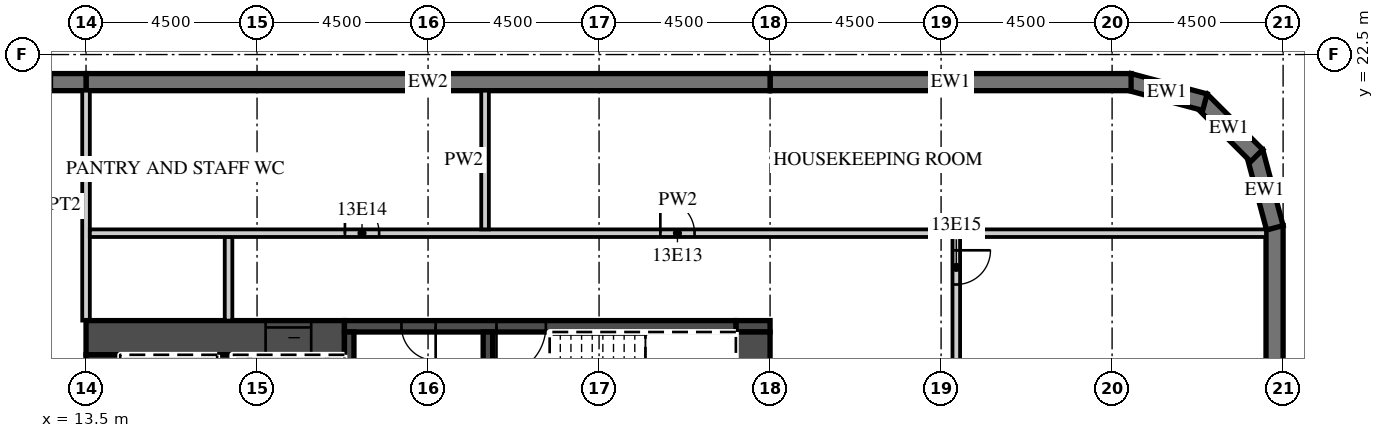
"""IFC4 building model, lengths in metres.
Left out: names, types, materials, properties, quantities, classifications, styles, units other than length and angle.
Written with IfcOpenShell. Run it as: python <this file> out.ifc"""

import sys

from ifc_helpers import new_model, si_unit, direction, frame, frame_2d, origin, place, context, subcontext, project, spatial, polyline, rectangle, outline, extrude, element, fill, save


model = new_model("IFC4")
c1 = context("Model", 3, precision=1e-05, world=origin(), true_north=direction((0.0, 1.0)))
c2 = subcontext(c1, "Body", "Model", "MODEL_VIEW")
j1 = project(units=[si_unit("LENGTHUNIT", "METRE"), si_unit("PLANEANGLEUNIT", "RADIAN")], contexts=[c1])
p1 = place(None, origin())
s1 = spatial("IfcSite", under=j1, at=p1, CompositionType="ELEMENT")
p2 = place(p1, origin())
s2 = spatial("IfcBuilding", under=s1, at=p2, CompositionType="ELEMENT")
p3 = place(p2, frame((0.0, 0.0, 73.2)))
s3 = spatial("IfcBuildingStorey", under=s2, at=p3, CompositionType="ELEMENT", Elevation=73.2)
p4 = place(p3, frame((44.775, -18.0, 0.0), z_axis=(0.0, 0.0, 1.0), x_axis=(0.0, 1.0, 0.0)))
e1 = element("IfcWall", 1, at=p4, inside=s3, PredefinedType="SOLIDWALL", context=c2, shape_type="SweptSolid", body=[
    extrude(rectangle(XDim=36.0, YDim=0.45, at=frame_2d((18.0, 0.0))), origin(), (0.0, 0.0, 1.0), 3.02),
])
p5 = place(p4, frame((3.9, 0.0, 0.45)))
e2 = element("IfcOpeningElement", 2, at=p5, cuts=e1, PredefinedType="OPENING", context=c2, shape_type="SweptSolid", body=[
    extrude(rectangle(XDim=3.3, YDim=2.25, at=frame_2d((1.65, 1.125))), frame((0.0, 0.235, 0.0), z_axis=(0.0, -1.0, 0.0), x_axis=(1.0, 0.0, 0.0)), (0.0, 0.0, 1.0), 0.47),
])
p6 = place(p4, frame((8.4, 0.0, 0.45)))
e3 = element("IfcOpeningElement", 3, at=p6, cuts=e1, PredefinedType="OPENING", context=c2, shape_type="SweptSolid", body=[
    extrude(rectangle(XDim=3.3, YDim=2.25, at=frame_2d((1.65, 1.125))), frame((0.0, 0.235, 0.0), z_axis=(0.0, -1.0, 0.0), x_axis=(1.0, 0.0, 0.0)), (0.0, 0.0, 1.0), 0.47),
])
p7 = place(p4, frame((12.9, 0.0, 0.45)))
e4 = element("IfcOpeningElement", 4, at=p7, cuts=e1, PredefinedType="OPENING", context=c2, shape_type="SweptSolid", body=[
    extrude(rectangle(XDim=3.3, YDim=2.25, at=frame_2d((1.65, 1.125))), frame((0.0, 0.235, 0.0), z_axis=(0.0, -1.0, 0.0), x_axis=(1.0, 0.0, 0.0)), (0.0, 0.0, 1.0), 0.47),
])
p8 = place(p3, frame((44.783, 17.942, 0.0), z_axis=(0.0, 0.0, 1.0), x_axis=(-0.25881466832, 0.965926999034, 0.0)))
e5 = element("IfcWall", 5, at=p8, inside=s3, PredefinedType="SOLIDWALL", context=c2, shape_type="SweptSolid", body=[
    extrude(outline(polyline([(0.0, -0.225), (2.071, -0.225), (1.95, 0.225), (0.121, 0.225), (0.0, -0.225)])), origin(), (0.0, 0.0, 1.0), 3.02),
])
p9 = place(p3, frame((44.305, 19.841, 0.0), z_axis=(0.0, 0.0, 1.0), x_axis=(-0.707106781187, 0.707106781187, 0.0)))
e6 = element("IfcWall", 6, at=p9, inside=s3, PredefinedType="SOLIDWALL", context=c2, shape_type="SweptSolid", body=[
    extrude(outline(polyline([(0.0, -0.225), (2.071, -0.225), (1.95, 0.225), (0.121, 0.225), (0.0, -0.225)])), origin(), (0.0, 0.0, 1.0), 3.02),
])
p10 = place(p3, frame((42.942, 21.247, 0.0), z_axis=(0.0, 0.0, 1.0), x_axis=(-0.965926999034, 0.25881466832, 0.0)))
e7 = element("IfcWall", 7, at=p10, inside=s3, PredefinedType="SOLIDWALL", context=c2, shape_type="SweptSolid", body=[
    extrude(outline(polyline([(-0.0, -0.225), (2.07, -0.225), (1.95, 0.225), (0.12, 0.225), (-0.0, -0.225)])), origin(), (0.0, 0.0, 1.0), 3.02),
])
p11 = place(p3, frame((41.0, 21.775, 0.0), z_axis=(0.0, 0.0, 1.0), x_axis=(-1.0, 0.0, 0.0)))
e8 = element("IfcWall", 8, at=p11, inside=s3, PredefinedType="SOLIDWALL", context=c2, shape_type="SweptSolid", body=[
    extrude(rectangle(XDim=9.5, YDim=0.45, at=frame_2d((4.75, 0.0))), origin(), (0.0, 0.0, 1.0), 3.02),
])
p12 = place(p3, frame((31.5, 21.775, 0.0), z_axis=(0.0, 0.0, 1.0), x_axis=(-1.0, 0.0, 0.0)))
e9 = element("IfcWall", 9, at=p12, inside=s3, PredefinedType="SOLIDWALL", context=c2, shape_type="SweptSolid", body=[
    extrude(rectangle(XDim=18.0, YDim=0.45, at=frame_2d((9.0, 0.0))), origin(), (0.0, 0.0, 1.0), 3.02),
])
p13 = place(p3, frame((13.5, 21.775, 0.0), z_axis=(0.0, 0.0, 1.0), x_axis=(-1.0, 0.0, 0.0)))
e10 = element("IfcWall", 10, at=p13, inside=s3, PredefinedType="SOLIDWALL", context=c2, shape_type="SweptSolid", body=[
    extrude(rectangle(XDim=54.5, YDim=0.45, at=frame_2d((27.25, 0.0))), origin(), (0.0, 0.0, 1.0), 3.02),
])
p14 = place(p13, frame((0.9, 0.0, 0.45)))
e11 = element("IfcOpeningElement", 11, at=p14, cuts=e10, PredefinedType="OPENING", context=c2, shape_type="SweptSolid", body=[
    extrude(rectangle(XDim=2.7, YDim=2.25, at=frame_2d((1.35, 1.125))), frame((0.0, 0.235, 0.0), z_axis=(0.0, -1.0, 0.0), x_axis=(1.0, 0.0, 0.0)), (0.0, 0.0, 1.0), 0.47),
])
p15 = place(p13, frame((5.4, 0.0, 0.45)))
e12 = element("IfcOpeningElement", 12, at=p15, cuts=e10, PredefinedType="OPENING", context=c2, shape_type="SweptSolid", body=[
    extrude(rectangle(XDim=2.7, YDim=2.25, at=frame_2d((1.35, 1.125))), frame((0.0, 0.235, 0.0), z_axis=(0.0, -1.0, 0.0), x_axis=(1.0, 0.0, 0.0)), (0.0, 0.0, 1.0), 0.47),
])
p16 = place(p13, frame((9.9, 0.0, 0.45)))
e13 = element("IfcOpeningElement", 13, at=p16, cuts=e10, PredefinedType="OPENING", context=c2, shape_type="SweptSolid", body=[
    extrude(rectangle(XDim=2.7, YDim=2.25, at=frame_2d((1.35, 1.125))), frame((0.0, 0.235, 0.0), z_axis=(0.0, -1.0, 0.0), x_axis=(1.0, 0.0, 0.0)), (0.0, 0.0, 1.0), 0.47),
])
p17 = place(p13, frame((14.4, 0.0, 0.45)))
e14 = element("IfcOpeningElement", 14, at=p17, cuts=e10, PredefinedType="OPENING", context=c2, shape_type="SweptSolid", body=[
    extrude(rectangle(XDim=2.7, YDim=2.25, at=frame_2d((1.35, 1.125))), frame((0.0, 0.235, 0.0), z_axis=(0.0, -1.0, 0.0), x_axis=(1.0, 0.0, 0.0)), (0.0, 0.0, 1.0), 0.47),
])
p18 = place(p13, frame((18.9, 0.0, 0.45)))
e15 = element("IfcOpeningElement", 15, at=p18, cuts=e10, PredefinedType="OPENING", context=c2, shape_type="SweptSolid", body=[
    extrude(rectangle(XDim=2.7, YDim=2.25, at=frame_2d((1.35, 1.125))), frame((0.0, 0.235, 0.0), z_axis=(0.0, -1.0, 0.0), x_axis=(1.0, 0.0, 0.0)), (0.0, 0.0, 1.0), 0.47),
])
p19 = place(p13, frame((23.4, 0.0, 0.45)))
e16 = element("IfcOpeningElement", 16, at=p19, cuts=e10, PredefinedType="OPENING", context=c2, shape_type="SweptSolid", body=[
    extrude(rectangle(XDim=2.7, YDim=2.25, at=frame_2d((1.35, 1.125))), frame((0.0, 0.235, 0.0), z_axis=(0.0, -1.0, 0.0), x_axis=(1.0, 0.0, 0.0)), (0.0, 0.0, 1.0), 0.47),
])
p20 = place(p13, frame((27.9, 0.0, 0.45)))
e17 = element("IfcOpeningElement", 17, at=p20, cuts=e10, PredefinedType="OPENING", context=c2, shape_type="SweptSolid", body=[
    extrude(rectangle(XDim=2.7, YDim=2.25, at=frame_2d((1.35, 1.125))), frame((0.0, 0.235, 0.0), z_axis=(0.0, -1.0, 0.0), x_axis=(1.0, 0.0, 0.0)), (0.0, 0.0, 1.0), 0.47),
])
p21 = place(p13, frame((32.4, 0.0, 0.45)))
e18 = element("IfcOpeningElement", 18, at=p21, cuts=e10, PredefinedType="OPENING", context=c2, shape_type="SweptSolid", body=[
    extrude(rectangle(XDim=2.7, YDim=2.25, at=frame_2d((1.35, 1.125))), frame((0.0, 0.235, 0.0), z_axis=(0.0, -1.0, 0.0), x_axis=(1.0, 0.0, 0.0)), (0.0, 0.0, 1.0), 0.47),
])
p22 = place(p13, frame((36.9, 0.0, 0.45)))
e19 = element("IfcOpeningElement", 19, at=p22, cuts=e10, PredefinedType="OPENING", context=c2, shape_type="SweptSolid", body=[
    extrude(rectangle(XDim=2.7, YDim=2.25, at=frame_2d((1.35, 1.125))), frame((0.0, 0.235, 0.0), z_axis=(0.0, -1.0, 0.0), x_axis=(1.0, 0.0, 0.0)), (0.0, 0.0, 1.0), 0.47),
])
p23 = place(p13, frame((41.4, 0.0, 0.45)))
e20 = element("IfcOpeningElement", 20, at=p23, cuts=e10, PredefinedType="OPENING", context=c2, shape_type="SweptSolid", body=[
    extrude(rectangle(XDim=2.7, YDim=2.25, at=frame_2d((1.35, 1.125))), frame((0.0, 0.235, 0.0), z_axis=(0.0, -1.0, 0.0), x_axis=(1.0, 0.0, 0.0)), (0.0, 0.0, 1.0), 0.47),
])
p24 = place(p13, frame((45.9, 0.0, 0.45)))
e21 = element("IfcOpeningElement", 21, at=p24, cuts=e10, PredefinedType="OPENING", context=c2, shape_type="SweptSolid", body=[
    extrude(rectangle(XDim=2.7, YDim=2.25, at=frame_2d((1.35, 1.125))), frame((0.0, 0.235, 0.0), z_axis=(0.0, -1.0, 0.0), x_axis=(1.0, 0.0, 0.0)), (0.0, 0.0, 1.0), 0.47),
])
p25 = place(p13, frame((50.4, 0.0, 0.45)))
e22 = element("IfcOpeningElement", 22, at=p25, cuts=e10, PredefinedType="OPENING", context=c2, shape_type="SweptSolid", body=[
    extrude(rectangle(XDim=2.7, YDim=2.25, at=frame_2d((1.35, 1.125))), frame((0.0, 0.235, 0.0), z_axis=(0.0, -1.0, 0.0), x_axis=(1.0, 0.0, 0.0)), (0.0, 0.0, 1.0), 0.47),
])
p26 = place(p3, frame((13.5, 15.5, 0.0), z_axis=(0.0, 0.0, 1.0), x_axis=(0.0, 1.0, 0.0)))
e23 = element("IfcWall", 23, at=p26, inside=s3, PredefinedType="PARTITIONING", context=c2, shape_type="SweptSolid", body=[
    extrude(rectangle(XDim=6.05, YDim=0.2, at=frame_2d((3.025, 0.0))), origin(), (0.0, 0.0, 1.0), 3.02),
])
p27 = place(p3, frame((13.5, 15.05, 0.0), z_axis=(0.0, 0.0, 1.0), x_axis=(1.0, 0.0, 0.0)))
e24 = element("IfcWall", 24, at=p27, inside=s3, PredefinedType="SHEAR", context=c2, shape_type="SweptSolid", body=[
    extrude(rectangle(XDim=6.8, YDim=0.9, at=frame_2d((3.4, 0.0))), origin(), (0.0, 0.0, 1.0), 3.02),
])
p28 = place(p27, frame((4.725, 0.0, 0.0)))
e25 = element("IfcOpeningElement", 25, at=p28, cuts=e24, PredefinedType="OPENING", context=c2, shape_type="SweptSolid", body=[
    extrude(rectangle(XDim=1.2, YDim=2.1, at=frame_2d((0.6, 1.05))), frame((0.0, 0.46, 0.0), z_axis=(0.0, -1.0, 0.0), x_axis=(1.0, 0.0, 0.0)), (0.0, 0.0, 1.0), 0.92),
])
p29 = place(p3, frame((30.6, 15.35, 0.0), z_axis=(0.0, 0.0, 1.0), x_axis=(1.0, 0.0, 0.0)))
e26 = element("IfcWall", 26, at=p29, inside=s3, PredefinedType="SHEAR", context=c2, shape_type="SweptSolid", body=[
    extrude(rectangle(XDim=0.9, YDim=0.3, at=frame_2d((0.45, 0.0))), origin(), (0.0, 0.0, 1.0), 3.02),
])
p30 = place(p3, frame((20.3, 15.35, 0.0), z_axis=(0.0, 0.0, 1.0), x_axis=(1.0, 0.0, 0.0)))
e27 = element("IfcWall", 27, at=p30, inside=s3, PredefinedType="SHEAR", context=c2, shape_type="SweptSolid", body=[
    extrude(rectangle(XDim=10.3, YDim=0.3, at=frame_2d((5.15, 0.0))), origin(), (0.0, 0.0, 1.0), 3.02),
])
p31 = place(p30, frame((4.0, 0.0, 0.0)))
e28 = element("IfcOpeningElement", 28, at=p31, cuts=e27, PredefinedType="OPENING", context=c2, shape_type="SweptSolid", body=[
    extrude(rectangle(XDim=1.3, YDim=2.1, at=frame_2d((0.65, 1.05))), frame((0.0, 0.16, 0.0), z_axis=(0.0, -1.0, 0.0), x_axis=(1.0, 0.0, 0.0)), (0.0, 0.0, 1.0), 0.32),
])
p32 = place(p30, frame((1.5, 0.0, 0.0)))
e29 = element("IfcOpeningElement", 29, at=p32, cuts=e27, PredefinedType="OPENING", context=c2, shape_type="SweptSolid", body=[
    extrude(rectangle(XDim=0.9, YDim=2.1, at=frame_2d((0.45, 1.05))), frame((0.0, 0.16, 0.0), z_axis=(0.0, -1.0, 0.0), x_axis=(1.0, 0.0, 0.0)), (0.0, 0.0, 1.0), 0.32),
])
p33 = place(p3, frame((31.05, 2.4, 0.0), z_axis=(0.0, 0.0, 1.0), x_axis=(0.0, 1.0, 0.0)))
e30 = element("IfcWall", 30, at=p33, inside=s3, PredefinedType="SHEAR", context=c2, shape_type="SweptSolid", body=[
    extrude(rectangle(XDim=12.8, YDim=0.9, at=frame_2d((6.4, 0.0))), origin(), (0.0, 0.0, 1.0), 3.02),
])
p34 = place(p33, frame((0.2, 0.0, 0.0)))
e31 = element("IfcOpeningElement", 31, at=p34, cuts=e30, PredefinedType="OPENING", context=c2, shape_type="SweptSolid", body=[
    extrude(rectangle(XDim=1.1, YDim=2.1, at=frame_2d((0.55, 1.05))), frame((0.0, 0.46, 0.0), z_axis=(0.0, -1.0, 0.0), x_axis=(1.0, 0.0, 0.0)), (0.0, 0.0, 1.0), 0.92),
])
p35 = place(p3, frame((13.95, 2.4, 0.0), z_axis=(0.0, 0.0, 1.0), x_axis=(0.0, 1.0, 0.0)))
e32 = element("IfcWall", 32, at=p35, inside=s3, PredefinedType="SHEAR", context=c2, shape_type="SweptSolid", body=[
    extrude(rectangle(XDim=12.2, YDim=0.9, at=frame_2d((6.1, 0.0))), origin(), (0.0, 0.0, 1.0), 3.02),
])
p36 = place(p3, frame((17.15, 8.8, 0.0), z_axis=(0.0, 0.0, 1.0), x_axis=(0.0, 1.0, 0.0)))
e33 = element("IfcWall", 33, at=p36, inside=s3, PredefinedType="SHEAR", context=c2, shape_type="SweptSolid", body=[
    extrude(rectangle(XDim=5.8, YDim=0.4, at=frame_2d((2.9, 0.0))), origin(), (0.0, 0.0, 1.0), 3.02),
])
for number, where, z_axis, x_axis in (
    (34, (20.425, 11.95, 0.0), (0.0, 0.0, 1.0), (0.0, 1.0, 0.0)),
    (35, (24.075, 11.95, 0.0), (0.0, 0.0, 1.0), (0.0, 1.0, 0.0)),
):
    element("IfcWall", number, at=place(p3, frame(where, z_axis=z_axis, x_axis=x_axis)), inside=s3, PredefinedType="SHEAR", context=c2, shape_type="SweptSolid", body=[
        extrude(rectangle(XDim=3.25, YDim=0.25, at=frame_2d((1.625, 0.0))), origin(), (0.0, 0.0, 1.0), 3.02),
    ])
p37 = place(p3, frame((17.25, 15.5, 0.0), z_axis=(0.0, 0.0, 1.0), x_axis=(0.0, 1.0, 0.0)))
e36 = element("IfcWall", 36, at=p37, inside=s3, PredefinedType="PARTITIONING", context=c2, shape_type="SweptSolid", body=[
    extrude(rectangle(XDim=2.2, YDim=0.2, at=frame_2d((1.1, 0.0))), origin(), (0.0, 0.0, 1.0), 3.02),
])
p38 = place(p3, frame((36.4, 1.75, 0.0), z_axis=(0.0, 0.0, 1.0), x_axis=(0.0, 1.0, 0.0)))
e37 = element("IfcWall", 37, at=p38, inside=s3, PredefinedType="PARTITIONING", context=c2, shape_type="SweptSolid", body=[
    extrude(rectangle(XDim=15.95, YDim=0.2, at=frame_2d((7.975, 0.0))), origin(), (0.0, 0.0, 1.0), 3.02),
])
p39 = place(p38, frame((14.7, 0.0, 0.0)))
e38 = element("IfcOpeningElement", 38, at=p39, cuts=e37, PredefinedType="OPENING", context=c2, shape_type="SweptSolid", body=[
    extrude(rectangle(XDim=0.9, YDim=2.1, at=frame_2d((0.45, 1.05))), frame((0.0, 0.11, 0.0), z_axis=(0.0, -1.0, 0.0), x_axis=(1.0, 0.0, 0.0)), (0.0, 0.0, 1.0), 0.22),
])
p40 = place(p3, frame((13.6, 17.8, 0.0), z_axis=(0.0, 0.0, 1.0), x_axis=(1.0, 0.0, 0.0)))
e39 = element("IfcWall", 39, at=p40, inside=s3, PredefinedType="PARTITIONING", context=c2, shape_type="SweptSolid", body=[
    extrude(rectangle(XDim=30.95, YDim=0.2, at=frame_2d((15.475, 0.0))), origin(), (0.0, 0.0, 1.0), 3.02),
])
p41 = place(p40, frame((15.012, 0.0, 0.0)))
e40 = element("IfcOpeningElement", 40, at=p41, cuts=e39, PredefinedType="OPENING", context=c2, shape_type="SweptSolid", body=[
    extrude(rectangle(XDim=0.9, YDim=2.1, at=frame_2d((0.45, 1.05))), frame((0.0, 0.11, 0.0), z_axis=(0.0, -1.0, 0.0), x_axis=(1.0, 0.0, 0.0)), (0.0, 0.0, 1.0), 0.22),
])
p42 = place(p40, frame((6.712, 0.0, 0.0)))
e41 = element("IfcOpeningElement", 41, at=p42, cuts=e39, PredefinedType="OPENING", context=c2, shape_type="SweptSolid", body=[
    extrude(rectangle(XDim=0.9, YDim=2.1, at=frame_2d((0.45, 1.05))), frame((0.0, 0.11, 0.0), z_axis=(0.0, -1.0, 0.0), x_axis=(1.0, 0.0, 0.0)), (0.0, 0.0, 1.0), 0.22),
])
p43 = place(p3, frame((24.0, 17.9, 0.0), z_axis=(0.0, 0.0, 1.0), x_axis=(0.0, 1.0, 0.0)))
e42 = element("IfcWall", 42, at=p43, inside=s3, PredefinedType="PARTITIONING", context=c2, shape_type="SweptSolid", body=[
    extrude(rectangle(XDim=3.65, YDim=0.2, at=frame_2d((1.825, 0.0))), origin(), (0.0, 0.0, 1.0), 3.02),
])
p44 = place(p28, origin())
e43 = element("IfcDoor", 43, at=p44, inside=s3, OperationType="SLIDING_TO_LEFT", PredefinedType="DOOR", context=c2, shape_type="SweptSolid", body=[
    extrude(rectangle(XDim=1.2, YDim=2.1, at=frame_2d((0.6, 1.05))), frame((0.0, 0.025, 0.0), z_axis=(0.0, -1.0, 0.0), x_axis=(1.0, 0.0, 0.0)), (0.0, 0.0, 1.0), 0.05),
])
fill(e25, e43)
p45 = place(p31, origin())
e44 = element("IfcDoor", 44, at=p45, inside=s3, OperationType="SINGLE_SWING_LEFT", PredefinedType="DOOR", context=c2, shape_type="SweptSolid", body=[
    extrude(rectangle(XDim=1.3, YDim=2.1, at=frame_2d((0.65, 1.05))), frame((0.0, 0.025, 0.0), z_axis=(0.0, -1.0, 0.0), x_axis=(1.0, 0.0, 0.0)), (0.0, 0.0, 1.0), 0.05),
])
fill(e28, e44)
p46 = place(p32, origin())
e45 = element("IfcDoor", 45, at=p46, inside=s3, OperationType="SINGLE_SWING_RIGHT", PredefinedType="DOOR", context=c2, shape_type="SweptSolid", body=[
    extrude(rectangle(XDim=0.9, YDim=2.1, at=frame_2d((0.45, 1.05))), frame((0.0, 0.025, 0.0), z_axis=(0.0, -1.0, 0.0), x_axis=(1.0, 0.0, 0.0)), (0.0, 0.0, 1.0), 0.05),
])
fill(e29, e45)
p47 = place(p41, origin())
e46 = element("IfcDoor", 46, at=p47, inside=s3, OperationType="SINGLE_SWING_LEFT", PredefinedType="DOOR", context=c2, shape_type="SweptSolid", body=[
    extrude(rectangle(XDim=0.9, YDim=2.1, at=frame_2d((0.45, 1.05))), frame((0.0, 0.025, 0.0), z_axis=(0.0, -1.0, 0.0), x_axis=(1.0, 0.0, 0.0)), (0.0, 0.0, 1.0), 0.05),
])
fill(e40, e46)
p48 = place(p42, origin())
e47 = element("IfcDoor", 47, at=p48, inside=s3, OperationType="SINGLE_SWING_LEFT", PredefinedType="DOOR", context=c2, shape_type="SweptSolid", body=[
    extrude(rectangle(XDim=0.9, YDim=2.1, at=frame_2d((0.45, 1.05))), frame((0.0, 0.025, 0.0), z_axis=(0.0, -1.0, 0.0), x_axis=(1.0, 0.0, 0.0)), (0.0, 0.0, 1.0), 0.05),
])
fill(e41, e47)
p49 = place(p39, origin())
e48 = element("IfcDoor", 48, at=p49, inside=s3, OperationType="SINGLE_SWING_RIGHT", PredefinedType="DOOR", context=c2, shape_type="SweptSolid", body=[
    extrude(rectangle(XDim=0.9, YDim=2.1, at=frame_2d((0.45, 1.05))), frame((0.0, 0.025, 0.0), z_axis=(0.0, -1.0, 0.0), x_axis=(1.0, 0.0, 0.0)), (0.0, 0.0, 1.0), 0.05),
])
fill(e38, e48)
save(model, sys.argv[1])
